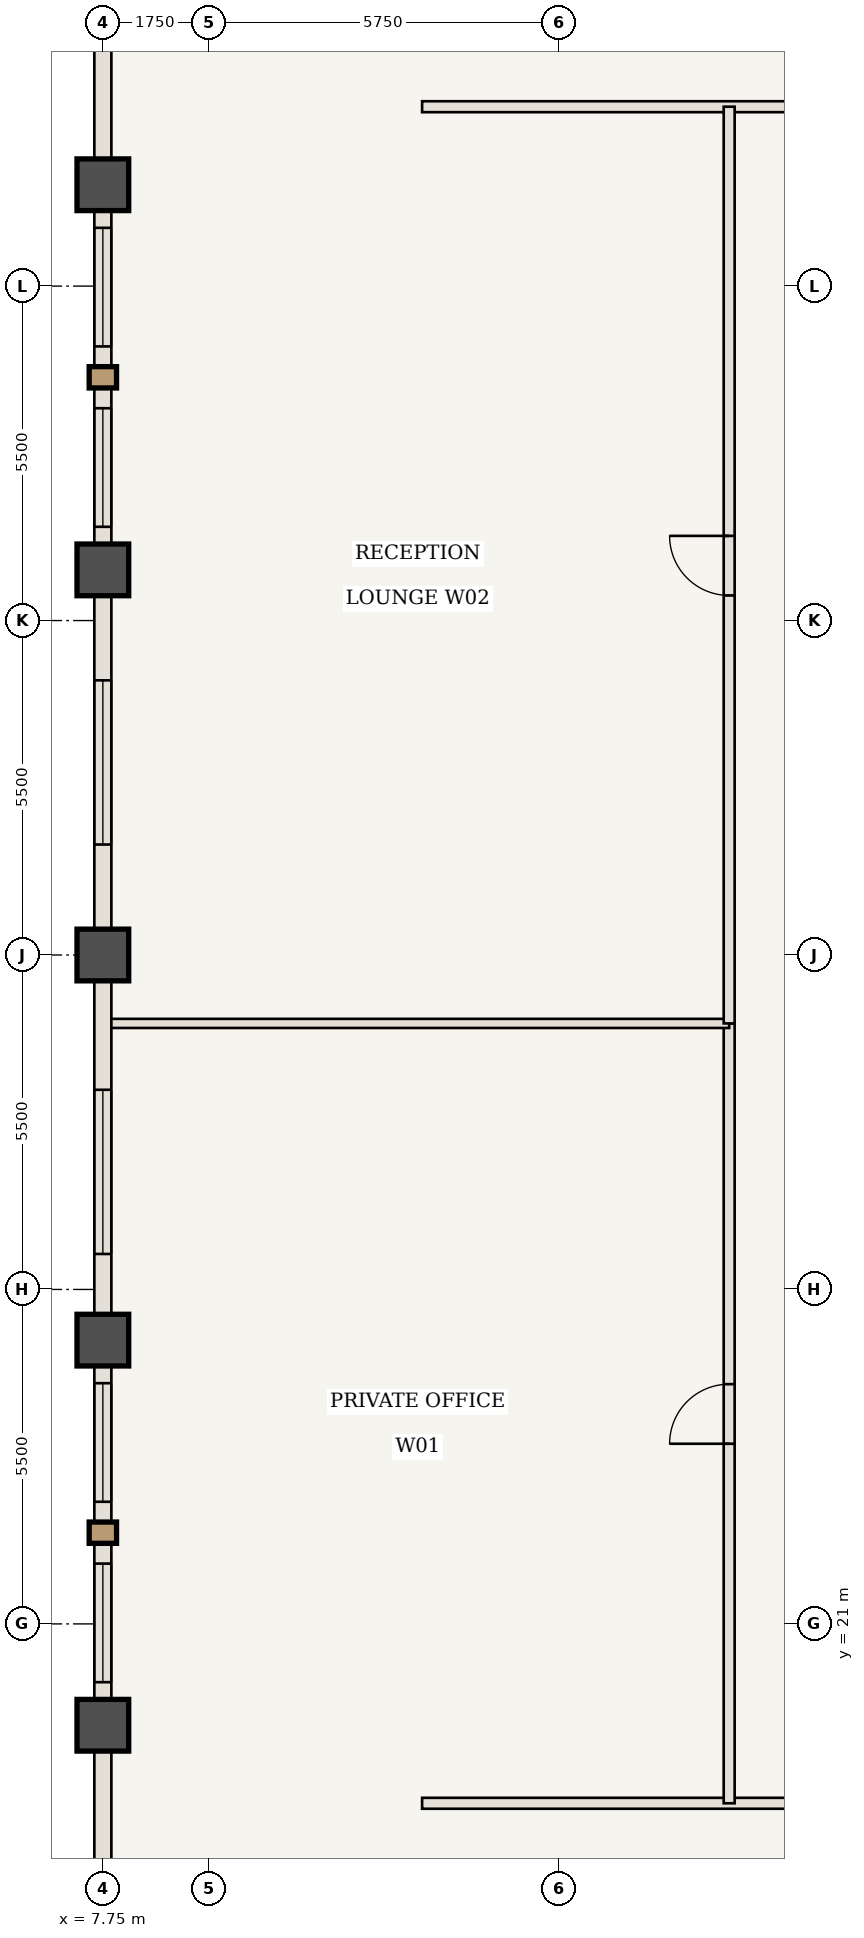
"""IFC4 building model, lengths in metres.
Left out: names, types, materials, properties, quantities, classifications, styles, units other than length and angle.
Written with IfcOpenShell. Run it as: python <this file> out.ifc"""

import sys

from ifc_helpers import new_model, si_unit, direction, frame, frame_2d, origin, origin_2d, place, context, subcontext, project, spatial, rectangle, extrude, element, fill, save


model = new_model("IFC4")
c1 = context("Model", 3, precision=1e-05, world=origin(), true_north=direction((0.0, 1.0)))
c2 = subcontext(c1, "Body", "Model", "MODEL_VIEW")
j1 = project(units=[si_unit("LENGTHUNIT", "METRE"), si_unit("PLANEANGLEUNIT", "RADIAN")], contexts=[c1])
p1 = place(None, origin())
s1 = spatial("IfcSite", under=j1, at=p1, CompositionType="ELEMENT")
p2 = place(p1, origin())
s2 = spatial("IfcBuilding", under=s1, at=p2, CompositionType="ELEMENT")
p3 = place(p2, frame((0.0, 0.0, 202.3)))
s3 = spatial("IfcBuildingStorey", under=s2, at=p3, CompositionType="ELEMENT", Elevation=202.3)
for number, where, z_axis, x_axis in (
    (1, (7.75, 19.333, 0.0), (0.0, 0.0, 1.0), (1.0, 0.0, 0.0)),
    (2, (7.75, 25.667, 0.0), (0.0, 0.0, 1.0), (1.0, 0.0, 0.0)),
    (3, (7.75, 32.0, 0.0), (0.0, 0.0, 1.0), (1.0, 0.0, 0.0)),
    (4, (7.75, 38.333, 0.0), (0.0, 0.0, 1.0), (1.0, 0.0, 0.0)),
    (5, (7.75, 44.667, 0.0), (0.0, 0.0, 1.0), (1.0, 0.0, 0.0)),
):
    element("IfcColumn", number, at=place(p3, frame(where, z_axis=z_axis, x_axis=x_axis)), inside=s3, PredefinedType="COLUMN", context=c2, shape_type="SweptSolid", body=[
        extrude(rectangle(XDim=0.85, YDim=0.85, at=origin_2d()), origin(), (0.0, 0.0, 1.0), 3.85),
    ])
p4 = place(p3, frame((13.0, 18.05, 0.0), z_axis=(0.0, 0.0, 1.0), x_axis=(1.0, 0.0, 0.0)))
e6 = element("IfcWall", 6, at=p4, inside=s3, PredefinedType="STANDARD", context=c2, shape_type="SweptSolid", body=[
    extrude(rectangle(XDim=13.242, YDim=0.18, at=frame_2d((6.621, 0.0))), origin(), (0.0, 0.0, 1.0), 3.685),
])
p5 = place(p4, frame((8.646, 0.0, 0.0)))
e7 = element("IfcOpeningElement", 7, at=p5, cuts=e6, PredefinedType="OPENING", context=c2, shape_type="SweptSolid", body=[
    extrude(rectangle(XDim=0.98, YDim=2.2, at=frame_2d((0.49, 1.1))), frame((0.0, 0.1, 0.0), z_axis=(0.0, -1.0, 0.0), x_axis=(1.0, 0.0, 0.0)), (0.0, 0.0, 1.0), 0.2),
])
p6 = place(p3, frame((13.0, 45.95, 0.0), z_axis=(0.0, 0.0, 1.0), x_axis=(1.0, 0.0, 0.0)))
e8 = element("IfcWall", 8, at=p6, inside=s3, PredefinedType="STANDARD", context=c2, shape_type="SweptSolid", body=[
    extrude(rectangle(XDim=13.592, YDim=0.18, at=frame_2d((6.796, 0.0))), origin(), (0.0, 0.0, 1.0), 3.685),
])
p7 = place(p6, frame((8.821, 0.0, 0.0)))
e9 = element("IfcOpeningElement", 9, at=p7, cuts=e8, PredefinedType="OPENING", context=c2, shape_type="SweptSolid", body=[
    extrude(rectangle(XDim=0.98, YDim=2.2, at=frame_2d((0.49, 1.1))), frame((0.0, 0.1, 0.0), z_axis=(0.0, -1.0, 0.0), x_axis=(1.0, 0.0, 0.0)), (0.0, 0.0, 1.0), 0.2),
])
p8 = place(p3, frame((18.05, 18.05, 0.0), z_axis=(0.0, 0.0, 1.0), x_axis=(0.0, 1.0, 0.0)))
e10 = element("IfcWall", 10, at=p8, inside=s3, PredefinedType="STANDARD", context=c2, shape_type="SweptSolid", body=[
    extrude(rectangle(XDim=12.825, YDim=0.18, at=frame_2d((6.413, 0.0))), origin(), (0.0, 0.0, 1.0), 3.685),
])
p9 = place(p8, frame((5.913, 0.0, 0.0)))
e11 = element("IfcOpeningElement", 11, at=p9, cuts=e10, PredefinedType="OPENING", context=c2, shape_type="SweptSolid", body=[
    extrude(rectangle(XDim=0.98, YDim=2.2, at=frame_2d((0.49, 1.1))), frame((0.0, 0.1, 0.0), z_axis=(0.0, -1.0, 0.0), x_axis=(1.0, 0.0, 0.0)), (0.0, 0.0, 1.0), 0.2),
])
p10 = place(p3, frame((7.81, 30.875, 0.0), z_axis=(0.0, 0.0, 1.0), x_axis=(1.0, 0.0, 0.0)))
e12 = element("IfcWall", 12, at=p10, inside=s3, PredefinedType="STANDARD", context=c2, shape_type="SweptSolid", body=[
    extrude(rectangle(XDim=10.24, YDim=0.15, at=frame_2d((5.12, 0.0))), origin(), (0.0, 0.0, 1.0), 3.685),
])
p11 = place(p3, frame((18.05, 30.875, 0.0), z_axis=(0.0, 0.0, 1.0), x_axis=(0.0, 1.0, 0.0)))
e13 = element("IfcWall", 13, at=p11, inside=s3, PredefinedType="STANDARD", context=c2, shape_type="SweptSolid", body=[
    extrude(rectangle(XDim=15.075, YDim=0.18, at=frame_2d((7.538, 0.0))), origin(), (0.0, 0.0, 1.0), 3.685),
])
p12 = place(p11, frame((7.038, 0.0, 0.0)))
e14 = element("IfcOpeningElement", 14, at=p12, cuts=e13, PredefinedType="OPENING", context=c2, shape_type="SweptSolid", body=[
    extrude(rectangle(XDim=0.98, YDim=2.2, at=frame_2d((0.49, 1.1))), frame((0.0, 0.1, 0.0), z_axis=(0.0, -1.0, 0.0), x_axis=(1.0, 0.0, 0.0)), (0.0, 0.0, 1.0), 0.2),
])
p13 = place(p3, frame((7.75, 13.0, 0.0), z_axis=(0.0, 0.0, 1.0), x_axis=(0.0, 1.0, 0.0)))
e15 = element("IfcWall", 15, at=p13, inside=s3, PredefinedType="USERDEFINED", context=c2, shape_type="SweptSolid", body=[
    extrude(rectangle(XDim=6.333, YDim=0.28, at=frame_2d((3.167, 0.0))), origin(), (0.0, 0.0, 1.0), 2.985),
])
p14 = place(p3, frame((7.75, 19.333, 0.0), z_axis=(0.0, 0.0, 1.0), x_axis=(0.0, 1.0, 0.0)))
e16 = element("IfcWall", 16, at=p14, inside=s3, PredefinedType="USERDEFINED", context=c2, shape_type="SweptSolid", body=[
    extrude(rectangle(XDim=6.333, YDim=0.28, at=frame_2d((3.167, 0.0))), origin(), (0.0, 0.0, 1.0), 2.985),
])
p15 = place(p14, frame((0.708, 0.0, 0.85)))
e17 = element("IfcOpeningElement", 17, at=p15, cuts=e16, PredefinedType="OPENING", context=c2, shape_type="SweptSolid", body=[
    extrude(rectangle(XDim=1.95, YDim=1.935, at=frame_2d((0.975, 0.968))), frame((0.0, 0.15, 0.0), z_axis=(0.0, -1.0, 0.0), x_axis=(1.0, 0.0, 0.0)), (0.0, 0.0, 1.0), 0.3),
])
p16 = place(p14, frame((3.675, 0.0, 0.85)))
e18 = element("IfcOpeningElement", 18, at=p16, cuts=e16, PredefinedType="OPENING", context=c2, shape_type="SweptSolid", body=[
    extrude(rectangle(XDim=1.95, YDim=1.935, at=frame_2d((0.975, 0.968))), frame((0.0, 0.15, 0.0), z_axis=(0.0, -1.0, 0.0), x_axis=(1.0, 0.0, 0.0)), (0.0, 0.0, 1.0), 0.3),
])
p17 = place(p3, frame((7.75, 25.667, 0.0), z_axis=(0.0, 0.0, 1.0), x_axis=(0.0, 1.0, 0.0)))
e19 = element("IfcWall", 19, at=p17, inside=s3, PredefinedType="USERDEFINED", context=c2, shape_type="SweptSolid", body=[
    extrude(rectangle(XDim=6.333, YDim=0.28, at=frame_2d((3.167, 0.0))), origin(), (0.0, 0.0, 1.0), 2.985),
])
p18 = place(p17, frame((1.417, 0.0, 0.85)))
e20 = element("IfcOpeningElement", 20, at=p18, cuts=e19, PredefinedType="OPENING", context=c2, shape_type="SweptSolid", body=[
    extrude(rectangle(XDim=2.7, YDim=1.935, at=frame_2d((1.35, 0.968))), frame((0.0, 0.15, 0.0), z_axis=(0.0, -1.0, 0.0), x_axis=(1.0, 0.0, 0.0)), (0.0, 0.0, 1.0), 0.3),
])
p19 = place(p3, frame((7.75, 32.0, 0.0), z_axis=(0.0, 0.0, 1.0), x_axis=(0.0, 1.0, 0.0)))
e21 = element("IfcWall", 21, at=p19, inside=s3, PredefinedType="USERDEFINED", context=c2, shape_type="SweptSolid", body=[
    extrude(rectangle(XDim=6.333, YDim=0.28, at=frame_2d((3.167, 0.0))), origin(), (0.0, 0.0, 1.0), 2.985),
])
p20 = place(p19, frame((1.817, 0.0, 0.85)))
e22 = element("IfcOpeningElement", 22, at=p20, cuts=e21, PredefinedType="OPENING", context=c2, shape_type="SweptSolid", body=[
    extrude(rectangle(XDim=2.7, YDim=1.935, at=frame_2d((1.35, 0.968))), frame((0.0, 0.15, 0.0), z_axis=(0.0, -1.0, 0.0), x_axis=(1.0, 0.0, 0.0)), (0.0, 0.0, 1.0), 0.3),
])
p21 = place(p3, frame((7.75, 38.333, 0.0), z_axis=(0.0, 0.0, 1.0), x_axis=(0.0, 1.0, 0.0)))
e23 = element("IfcWall", 23, at=p21, inside=s3, PredefinedType="USERDEFINED", context=c2, shape_type="SweptSolid", body=[
    extrude(rectangle(XDim=6.333, YDim=0.28, at=frame_2d((3.167, 0.0))), origin(), (0.0, 0.0, 1.0), 2.985),
])
p22 = place(p21, frame((0.708, 0.0, 0.85)))
e24 = element("IfcOpeningElement", 24, at=p22, cuts=e23, PredefinedType="OPENING", context=c2, shape_type="SweptSolid", body=[
    extrude(rectangle(XDim=1.95, YDim=1.935, at=frame_2d((0.975, 0.968))), frame((0.0, 0.15, 0.0), z_axis=(0.0, -1.0, 0.0), x_axis=(1.0, 0.0, 0.0)), (0.0, 0.0, 1.0), 0.3),
])
p23 = place(p21, frame((3.675, 0.0, 0.85)))
e25 = element("IfcOpeningElement", 25, at=p23, cuts=e23, PredefinedType="OPENING", context=c2, shape_type="SweptSolid", body=[
    extrude(rectangle(XDim=1.95, YDim=1.935, at=frame_2d((0.975, 0.968))), frame((0.0, 0.15, 0.0), z_axis=(0.0, -1.0, 0.0), x_axis=(1.0, 0.0, 0.0)), (0.0, 0.0, 1.0), 0.3),
])
p24 = place(p3, frame((7.75, 44.667, 0.0), z_axis=(0.0, 0.0, 1.0), x_axis=(0.0, 1.0, 0.0)))
e26 = element("IfcWall", 26, at=p24, inside=s3, PredefinedType="USERDEFINED", context=c2, shape_type="SweptSolid", body=[
    extrude(rectangle(XDim=6.333, YDim=0.28, at=frame_2d((3.167, 0.0))), origin(), (0.0, 0.0, 1.0), 2.985),
])
p25 = place(p9, origin())
e27 = element("IfcDoor", 27, at=p25, inside=s3, OperationType="SINGLE_SWING_LEFT", PredefinedType="DOOR", context=c2, shape_type="SweptSolid", body=[
    extrude(rectangle(XDim=0.98, YDim=2.2, at=frame_2d((0.49, 1.1))), frame((0.0, 0.025, 0.0), z_axis=(0.0, -1.0, 0.0), x_axis=(1.0, 0.0, 0.0)), (0.0, 0.0, 1.0), 0.05),
])
fill(e11, e27)
p26 = place(p12, origin())
e28 = element("IfcDoor", 28, at=p26, inside=s3, OperationType="SINGLE_SWING_RIGHT", PredefinedType="DOOR", context=c2, shape_type="SweptSolid", body=[
    extrude(rectangle(XDim=0.98, YDim=2.2, at=frame_2d((0.49, 1.1))), frame((0.0, 0.025, 0.0), z_axis=(0.0, -1.0, 0.0), x_axis=(1.0, 0.0, 0.0)), (0.0, 0.0, 1.0), 0.05),
])
fill(e14, e28)
p27 = place(p15, origin())
e29 = element("IfcWindow", 29, at=p27, inside=s3, PartitioningType="SINGLE_PANEL", PredefinedType="WINDOW", context=c2, shape_type="SweptSolid", body=[
    extrude(rectangle(XDim=1.95, YDim=1.935, at=frame_2d((0.975, 0.968))), frame((0.0, 0.03, 0.0), z_axis=(0.0, -1.0, 0.0), x_axis=(1.0, 0.0, 0.0)), (0.0, 0.0, 1.0), 0.06),
])
fill(e17, e29)
p28 = place(p16, origin())
e30 = element("IfcWindow", 30, at=p28, inside=s3, PartitioningType="SINGLE_PANEL", PredefinedType="WINDOW", context=c2, shape_type="SweptSolid", body=[
    extrude(rectangle(XDim=1.95, YDim=1.935, at=frame_2d((0.975, 0.968))), frame((0.0, 0.03, 0.0), z_axis=(0.0, -1.0, 0.0), x_axis=(1.0, 0.0, 0.0)), (0.0, 0.0, 1.0), 0.06),
])
fill(e18, e30)
p29 = place(p18, origin())
e31 = element("IfcWindow", 31, at=p29, inside=s3, PartitioningType="SINGLE_PANEL", PredefinedType="WINDOW", context=c2, shape_type="SweptSolid", body=[
    extrude(rectangle(XDim=2.7, YDim=1.935, at=frame_2d((1.35, 0.968))), frame((0.0, 0.03, 0.0), z_axis=(0.0, -1.0, 0.0), x_axis=(1.0, 0.0, 0.0)), (0.0, 0.0, 1.0), 0.06),
])
fill(e20, e31)
p30 = place(p20, origin())
e32 = element("IfcWindow", 32, at=p30, inside=s3, PartitioningType="SINGLE_PANEL", PredefinedType="WINDOW", context=c2, shape_type="SweptSolid", body=[
    extrude(rectangle(XDim=2.7, YDim=1.935, at=frame_2d((1.35, 0.968))), frame((0.0, 0.03, 0.0), z_axis=(0.0, -1.0, 0.0), x_axis=(1.0, 0.0, 0.0)), (0.0, 0.0, 1.0), 0.06),
])
fill(e22, e32)
p31 = place(p22, origin())
e33 = element("IfcWindow", 33, at=p31, inside=s3, PartitioningType="SINGLE_PANEL", PredefinedType="WINDOW", context=c2, shape_type="SweptSolid", body=[
    extrude(rectangle(XDim=1.95, YDim=1.935, at=frame_2d((0.975, 0.968))), frame((0.0, 0.03, 0.0), z_axis=(0.0, -1.0, 0.0), x_axis=(1.0, 0.0, 0.0)), (0.0, 0.0, 1.0), 0.06),
])
fill(e24, e33)
p32 = place(p23, origin())
e34 = element("IfcWindow", 34, at=p32, inside=s3, PartitioningType="SINGLE_PANEL", PredefinedType="WINDOW", context=c2, shape_type="SweptSolid", body=[
    extrude(rectangle(XDim=1.95, YDim=1.935, at=frame_2d((0.975, 0.968))), frame((0.0, 0.03, 0.0), z_axis=(0.0, -1.0, 0.0), x_axis=(1.0, 0.0, 0.0)), (0.0, 0.0, 1.0), 0.06),
])
fill(e25, e34)
save(model, sys.argv[1])
